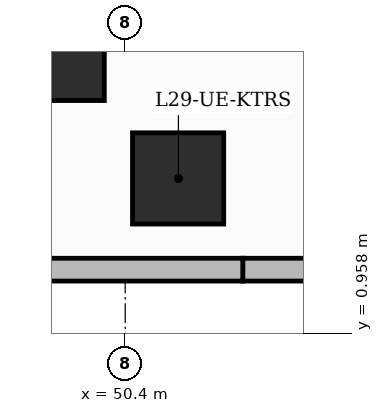
"""IFC4 building model, lengths in metres.
Left out: names, types, materials, properties, quantities, classifications, styles, units other than length and angle.
Written with IfcOpenShell. Run it as: python <this file> out.ifc"""

import sys

from ifc_helpers import new_model, si_unit, direction, frame, frame_2d, origin, origin_2d, place, context, subcontext, project, spatial, rectangle, extrude, element, save


model = new_model("IFC4")
c1 = context("Model", 3, precision=1e-05, world=origin(), true_north=direction((0.0, 1.0)))
c2 = subcontext(c1, "Body", "Model", "MODEL_VIEW")
j1 = project(units=[si_unit("LENGTHUNIT", "METRE"), si_unit("PLANEANGLEUNIT", "RADIAN")], contexts=[c1])
p1 = place(None, origin())
s1 = spatial("IfcSite", under=j1, at=p1, CompositionType="ELEMENT")
p2 = place(p1, origin())
s2 = spatial("IfcBuilding", under=s1, at=p2, CompositionType="ELEMENT")
p3 = place(p2, frame((0.0, 0.0, 117.6)))
s3 = spatial("IfcBuildingStorey", under=s2, at=p3, CompositionType="ELEMENT", Elevation=117.6)
p4 = place(p3, frame((49.6, 4.55, 0.0), z_axis=(0.0, 0.0, 1.0), x_axis=(1.0, 0.0, 0.0)))
e1 = element("IfcColumn", 1, at=p4, inside=s3, PredefinedType="COLUMN", context=c2, shape_type="SweptSolid", body=[
    extrude(rectangle(XDim=1.05, YDim=1.05, at=origin_2d()), origin(), (0.0, 0.0, 1.0), 3.6),
])
p5 = place(p3, frame((51.096, 3.0, 0.0), z_axis=(0.0, 0.0, 1.0), x_axis=(1.0, 0.0, 0.0)))
e2 = element("IfcColumn", 2, at=p5, inside=s3, PredefinedType="COLUMN", context=c2, shape_type="SweptSolid", body=[
    extrude(rectangle(XDim=1.2, YDim=1.2, at=origin_2d()), origin(), (0.0, 0.0, 1.0), 3.6),
])
p6 = place(p3, frame((58.35, 1.8, 0.0), z_axis=(0.0, 0.0, 1.0), x_axis=(-1.0, 0.0, 0.0)))
e3 = element("IfcWall", 3, at=p6, inside=s3, PredefinedType="SOLIDWALL", context=c2, shape_type="SweptSolid", body=[
    extrude(rectangle(XDim=6.403, YDim=0.3, at=frame_2d((3.202, 0.0))), origin(), (0.0, 0.0, 1.0), 3.35),
])
p7 = place(p6, frame((3.035, 0.0, 0.6)))
e4 = element("IfcOpeningElement", 4, at=p7, cuts=e3, PredefinedType="OPENING", context=c2, shape_type="SweptSolid", body=[
    extrude(rectangle(XDim=1.8, YDim=2.1, at=frame_2d((0.9, 1.05))), frame((0.0, 0.16, 0.0), z_axis=(0.0, -1.0, 0.0), x_axis=(1.0, 0.0, 0.0)), (0.0, 0.0, 1.0), 0.32),
])
p8 = place(p3, frame((51.947, 1.8, 0.0), z_axis=(0.0, 0.0, 1.0), x_axis=(-1.0, 0.0, 0.0)))
e5 = element("IfcWall", 5, at=p8, inside=s3, PredefinedType="SOLIDWALL", context=c2, shape_type="SweptSolid", body=[
    extrude(rectangle(XDim=6.993, YDim=0.3, at=frame_2d((3.497, 0.0))), origin(), (0.0, 0.0, 1.0), 3.35),
])
p9 = place(p8, frame((3.475, 0.0, 0.55)))
e6 = element("IfcOpeningElement", 6, at=p9, cuts=e5, PredefinedType="OPENING", context=c2, shape_type="SweptSolid", body=[
    extrude(rectangle(XDim=1.6, YDim=2.2, at=frame_2d((0.8, 1.1))), frame((0.0, 0.16, 0.0), z_axis=(0.0, -1.0, 0.0), x_axis=(1.0, 0.0, 0.0)), (0.0, 0.0, 1.0), 0.32),
])
save(model, sys.argv[1])
